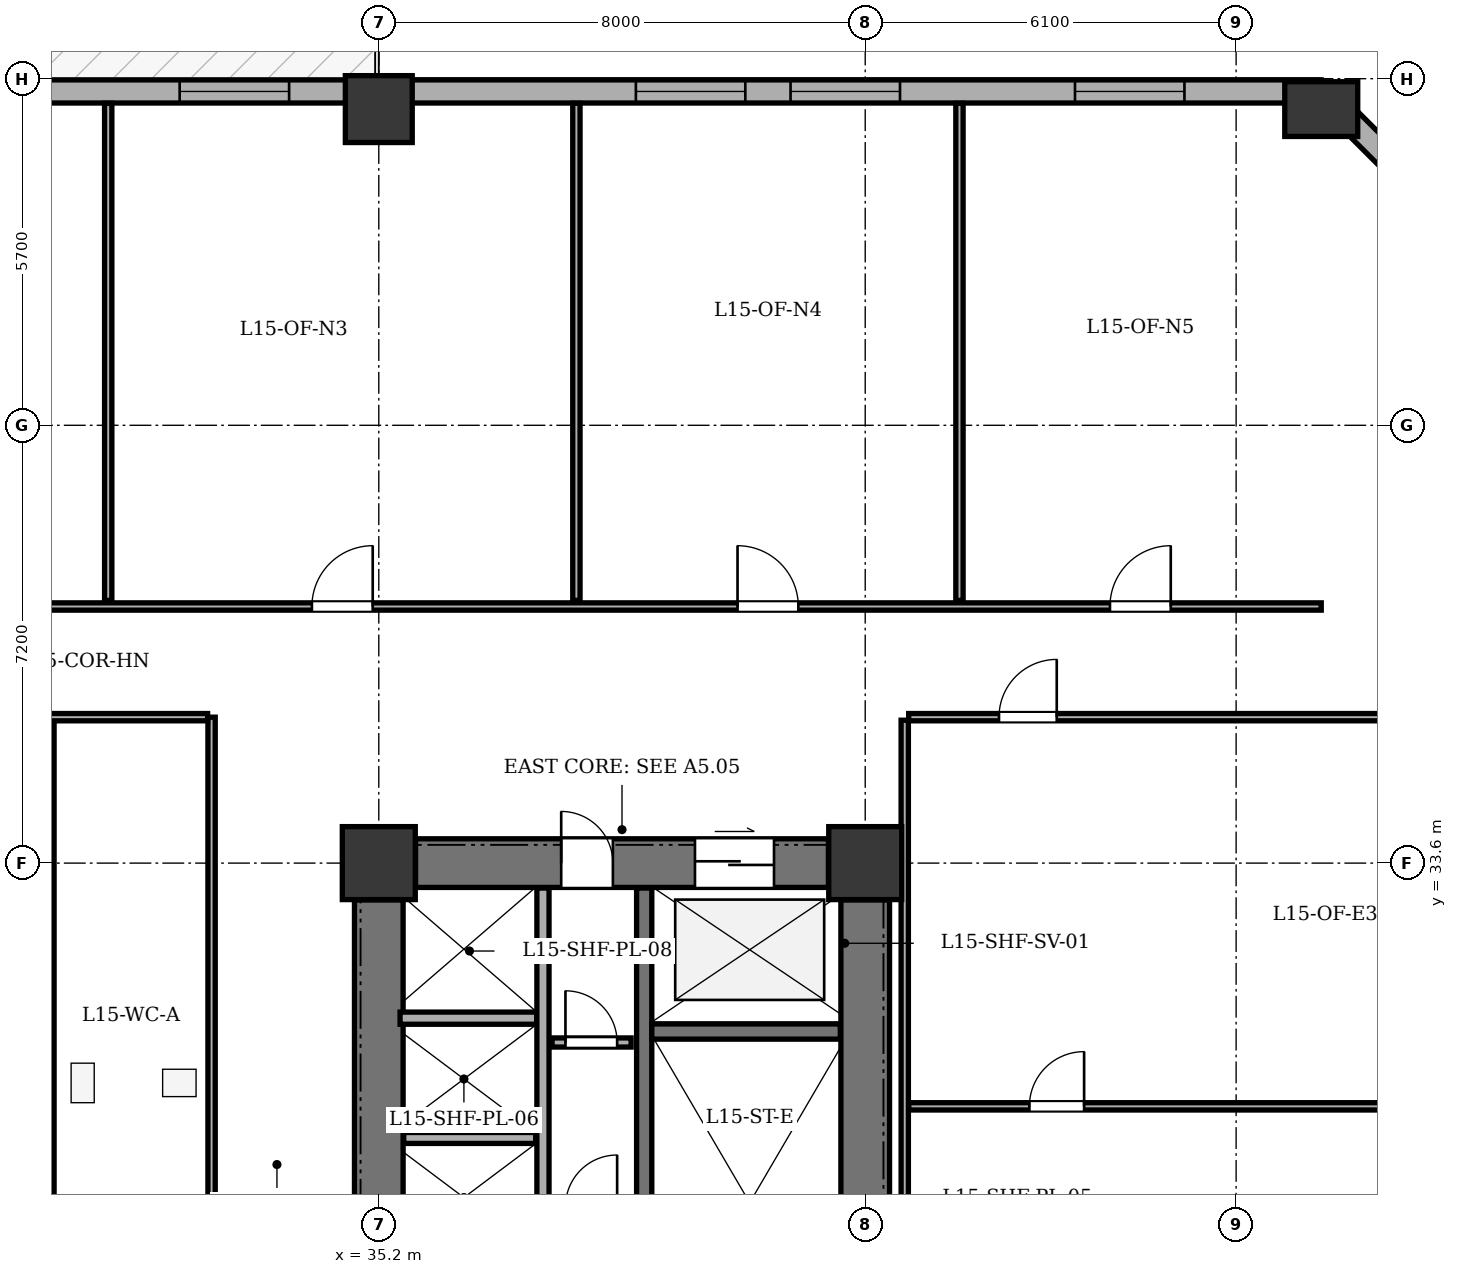
"""IFC4 building model, lengths in metres.
Left out: names, types, materials, properties, quantities, classifications, styles, units other than length and angle.
Written with IfcOpenShell. Run it as: python <this file> out.ifc"""

import sys

from ifc_helpers import new_model, si_unit, direction, frame, frame_2d, origin, origin_2d, place, context, subcontext, project, spatial, rectangle, extrude, element, fill, save


model = new_model("IFC4")
c1 = context("Model", 3, precision=1e-05, world=origin(), true_north=direction((0.0, 1.0)))
c2 = subcontext(c1, "Body", "Model", "MODEL_VIEW")
j1 = project(units=[si_unit("LENGTHUNIT", "METRE"), si_unit("PLANEANGLEUNIT", "RADIAN")], contexts=[c1])
p1 = place(None, origin())
s1 = spatial("IfcSite", under=j1, at=p1, CompositionType="ELEMENT")
p2 = place(p1, origin())
s2 = spatial("IfcBuilding", under=s1, at=p2, CompositionType="ELEMENT")
p3 = place(p2, frame((0.0, 0.0, 63.3)))
s3 = spatial("IfcBuildingStorey", under=s2, at=p3, CompositionType="ELEMENT", Elevation=63.3)
for number, where, z_axis, x_axis in (
    (1, (35.2, 33.6, 0.0), (0.0, 0.0, 1.0), (1.0, 0.0, 0.0)),
    (2, (43.2, 33.6, 0.0), (0.0, 0.0, 1.0), (1.0, 0.0, 0.0)),
):
    element("IfcColumn", number, at=place(p3, frame(where, z_axis=z_axis, x_axis=x_axis)), inside=s3, PredefinedType="COLUMN", context=c2, shape_type="SweptSolid", body=[
        extrude(rectangle(XDim=1.2, YDim=1.2, at=origin_2d()), origin(), (0.0, 0.0, 1.0), 3.9),
    ])
p4 = place(p3, frame((35.2, 46.0, 0.0), z_axis=(0.0, 0.0, 1.0), x_axis=(1.0, 0.0, 0.0)))
e3 = element("IfcColumn", 3, at=p4, inside=s3, PredefinedType="COLUMN", context=c2, shape_type="SweptSolid", body=[
    extrude(rectangle(XDim=1.1, YDim=1.1, at=origin_2d()), origin(), (0.0, 0.0, 1.0), 3.9),
])
p5 = place(p3, frame((50.7, 46.0, 0.0), z_axis=(0.0, 0.0, 1.0), x_axis=(1.0, 0.0, 0.0)))
e4 = element("IfcColumn", 4, at=p5, inside=s3, PredefinedType="COLUMN", context=c2, shape_type="SweptSolid", body=[
    extrude(rectangle(XDim=0.9, YDim=1.2, at=origin_2d()), origin(), (0.0, 0.0, 1.0), 3.9),
])
p6 = place(p3, frame((15.7, 46.29, 0.0), z_axis=(0.0, 0.0, 1.0), x_axis=(1.0, 0.0, 0.0)))
e5 = element("IfcWall", 5, at=p6, inside=s3, PredefinedType="STANDARD", context=c2, shape_type="SweptSolid", body=[
    extrude(rectangle(XDim=35.0, YDim=0.38, at=frame_2d((17.5, 0.0))), origin(), (0.0, 0.0, 1.0), 3.135),
])
p7 = place(p6, frame((8.0, 0.0, 0.0)))
e6 = element("IfcOpeningElement", 6, at=p7, cuts=e5, PredefinedType="OPENING", context=c2, shape_type="SweptSolid", body=[
    extrude(rectangle(XDim=1.0, YDim=2.02, at=frame_2d((0.5, 1.01))), frame((0.0, 0.2, 0.0), z_axis=(0.0, -1.0, 0.0), x_axis=(1.0, 0.0, 0.0)), (0.0, 0.0, 1.0), 0.4),
])
p8 = place(p6, frame((1.675, 0.0, 0.8)))
e7 = element("IfcOpeningElement", 7, at=p8, cuts=e5, PredefinedType="OPENING", context=c2, shape_type="SweptSolid", body=[
    extrude(rectangle(XDim=1.8, YDim=1.9, at=frame_2d((0.9, 0.95))), frame((0.0, 0.2, 0.0), z_axis=(0.0, -1.0, 0.0), x_axis=(1.0, 0.0, 0.0)), (0.0, 0.0, 1.0), 0.4),
])
p9 = place(p6, frame((16.225, 0.0, 0.8)))
e8 = element("IfcOpeningElement", 8, at=p9, cuts=e5, PredefinedType="OPENING", context=c2, shape_type="SweptSolid", body=[
    extrude(rectangle(XDim=1.8, YDim=1.9, at=frame_2d((0.9, 0.95))), frame((0.0, 0.2, 0.0), z_axis=(0.0, -1.0, 0.0), x_axis=(1.0, 0.0, 0.0)), (0.0, 0.0, 1.0), 0.4),
])
p10 = place(p6, frame((23.728, 0.0, 0.8)))
e9 = element("IfcOpeningElement", 9, at=p10, cuts=e5, PredefinedType="OPENING", context=c2, shape_type="SweptSolid", body=[
    extrude(rectangle(XDim=1.8, YDim=1.9, at=frame_2d((0.9, 0.95))), frame((0.0, 0.2, 0.0), z_axis=(0.0, -1.0, 0.0), x_axis=(1.0, 0.0, 0.0)), (0.0, 0.0, 1.0), 0.4),
])
p11 = place(p6, frame((26.272, 0.0, 0.8)))
e10 = element("IfcOpeningElement", 10, at=p11, cuts=e5, PredefinedType="OPENING", context=c2, shape_type="SweptSolid", body=[
    extrude(rectangle(XDim=1.8, YDim=1.9, at=frame_2d((0.9, 0.95))), frame((0.0, 0.2, 0.0), z_axis=(0.0, -1.0, 0.0), x_axis=(1.0, 0.0, 0.0)), (0.0, 0.0, 1.0), 0.4),
])
p12 = place(p6, frame((30.95, 0.0, 0.8)))
e11 = element("IfcOpeningElement", 11, at=p12, cuts=e5, PredefinedType="OPENING", context=c2, shape_type="SweptSolid", body=[
    extrude(rectangle(XDim=1.8, YDim=1.9, at=frame_2d((0.9, 0.95))), frame((0.0, 0.2, 0.0), z_axis=(0.0, -1.0, 0.0), x_axis=(1.0, 0.0, 0.0)), (0.0, 0.0, 1.0), 0.4),
])
p13 = place(p3, frame((50.7, 46.29, 0.0), z_axis=(0.0, 0.0, 1.0), x_axis=(0.707106781187, -0.707106781187, 0.0)))
e12 = element("IfcWall", 12, at=p13, inside=s3, PredefinedType="STANDARD", context=c2, shape_type="SweptSolid", body=[
    extrude(rectangle(XDim=6.774, YDim=0.38, at=frame_2d((3.387, 0.0))), origin(), (0.0, 0.0, 1.0), 3.135),
])
p14 = place(p13, frame((2.687, 0.0, 0.8)))
e13 = element("IfcOpeningElement", 13, at=p14, cuts=e12, PredefinedType="OPENING", context=c2, shape_type="SweptSolid", body=[
    extrude(rectangle(XDim=1.4, YDim=1.65, at=frame_2d((0.7, 0.825))), frame((0.0, 0.2, 0.0), z_axis=(0.0, -1.0, 0.0), x_axis=(1.0, 0.0, 0.0)), (0.0, 0.0, 1.0), 0.4),
])
p15 = place(p3, frame((43.2, 21.405, 0.0), z_axis=(0.0, 0.0, 1.0), x_axis=(0.0, 1.0, 0.0)))
e14 = element("IfcWall", 14, at=p15, inside=s3, PredefinedType="SHEAR", context=c2, shape_type="SweptSolid", body=[
    extrude(rectangle(XDim=11.59, YDim=0.8, at=frame_2d((5.795, 0.0))), origin(), (0.0, 0.0, 1.0), 3.6),
])
p16 = place(p3, frame((35.805, 33.6, 0.0), z_axis=(0.0, 0.0, 1.0), x_axis=(1.0, 0.0, 0.0)))
e15 = element("IfcWall", 15, at=p16, inside=s3, PredefinedType="SHEAR", context=c2, shape_type="SweptSolid", body=[
    extrude(rectangle(XDim=6.79, YDim=0.8, at=frame_2d((3.395, 0.0))), origin(), (0.0, 0.0, 1.0), 3.6),
])
p17 = place(p16, frame((4.595, 0.0, 0.0)))
e16 = element("IfcOpeningElement", 16, at=p17, cuts=e15, PredefinedType="OPENING", context=c2, shape_type="SweptSolid", body=[
    extrude(rectangle(XDim=1.3, YDim=2.15, at=frame_2d((0.65, 1.075))), frame((0.0, 0.41, 0.0), z_axis=(0.0, -1.0, 0.0), x_axis=(1.0, 0.0, 0.0)), (0.0, 0.0, 1.0), 0.82),
])
p18 = place(p16, frame((2.395, 0.0, 0.0)))
e17 = element("IfcOpeningElement", 17, at=p18, cuts=e15, PredefinedType="OPENING", context=c2, shape_type="SweptSolid", body=[
    extrude(rectangle(XDim=0.85, YDim=2.02, at=frame_2d((0.425, 1.01))), frame((0.0, 0.41, 0.0), z_axis=(0.0, -1.0, 0.0), x_axis=(1.0, 0.0, 0.0)), (0.0, 0.0, 1.0), 0.82),
])
p19 = place(p3, frame((35.2, 21.405, 0.0), z_axis=(0.0, 0.0, 1.0), x_axis=(0.0, 1.0, 0.0)))
e18 = element("IfcWall", 18, at=p19, inside=s3, PredefinedType="SHEAR", context=c2, shape_type="SweptSolid", body=[
    extrude(rectangle(XDim=11.59, YDim=0.8, at=frame_2d((5.795, 0.0))), origin(), (0.0, 0.0, 1.0), 3.6),
])
p20 = place(p19, frame((1.195, 0.0, 0.0)))
e19 = element("IfcOpeningElement", 19, at=p20, cuts=e18, PredefinedType="OPENING", context=c2, shape_type="SweptSolid", body=[
    extrude(rectangle(XDim=1.2, YDim=2.15, at=frame_2d((0.6, 1.075))), frame((0.0, 0.41, 0.0), z_axis=(0.0, -1.0, 0.0), x_axis=(1.0, 0.0, 0.0)), (0.0, 0.0, 1.0), 0.82),
])
p21 = place(p3, frame((39.565, 21.21, 0.0), z_axis=(0.0, 0.0, 1.0), x_axis=(0.0, 1.0, 0.0)))
e20 = element("IfcWall", 20, at=p21, inside=s3, PredefinedType="SHEAR", context=c2, shape_type="SweptSolid", body=[
    extrude(rectangle(XDim=11.98, YDim=0.25, at=frame_2d((5.99, 0.0))), origin(), (0.0, 0.0, 1.0), 3.6),
])
p22 = place(p21, frame((0.44, 0.0, 0.0)))
e21 = element("IfcOpeningElement", 21, at=p22, cuts=e20, PredefinedType="OPENING", context=c2, shape_type="SweptSolid", body=[
    extrude(rectangle(XDim=1.2, YDim=2.15, at=frame_2d((0.6, 1.075))), frame((0.0, 0.135, 0.0), z_axis=(0.0, -1.0, 0.0), x_axis=(1.0, 0.0, 0.0)), (0.0, 0.0, 1.0), 0.27),
])
p23 = place(p21, frame((2.59, 0.0, 0.0)))
e22 = element("IfcOpeningElement", 22, at=p23, cuts=e20, PredefinedType="OPENING", context=c2, shape_type="SweptSolid", body=[
    extrude(rectangle(XDim=1.15, YDim=2.15, at=frame_2d((0.575, 1.075))), frame((0.0, 0.135, 0.0), z_axis=(0.0, -1.0, 0.0), x_axis=(1.0, 0.0, 0.0)), (0.0, 0.0, 1.0), 0.27),
])
p24 = place(p3, frame((39.69, 30.83, 0.0), z_axis=(0.0, 0.0, 1.0), x_axis=(1.0, 0.0, 0.0)))
e23 = element("IfcWall", 23, at=p24, inside=s3, PredefinedType="SHEAR", context=c2, shape_type="SweptSolid", body=[
    extrude(rectangle(XDim=3.1, YDim=0.25, at=frame_2d((1.55, 0.0))), origin(), (0.0, 0.0, 1.0), 3.6),
])
p25 = place(p3, frame((35.55, 31.05, 0.0), z_axis=(0.0, 0.0, 1.0), x_axis=(1.0, 0.0, 0.0)))
e24 = element("IfcWall", 24, at=p25, inside=s3, PredefinedType="SOLIDWALL", context=c2, shape_type="SweptSolid", body=[
    extrude(rectangle(XDim=2.25, YDim=0.2, at=frame_2d((1.125, 0.0))), origin(), (0.0, 0.0, 1.0), 3.6),
])
p26 = place(p3, frame((37.9, 25.27, 0.0), z_axis=(0.0, 0.0, 1.0), x_axis=(0.0, 1.0, 0.0)))
e25 = element("IfcWall", 25, at=p26, inside=s3, PredefinedType="SOLIDWALL", context=c2, shape_type="SweptSolid", body=[
    extrude(rectangle(XDim=7.92, YDim=0.2, at=frame_2d((3.96, 0.0))), origin(), (0.0, 0.0, 1.0), 3.6),
])
p27 = place(p3, frame((35.61, 29.08, 0.0), z_axis=(0.0, 0.0, 1.0), x_axis=(1.0, 0.0, 0.0)))
e26 = element("IfcWall", 26, at=p27, inside=s3, PredefinedType="PARTITIONING", context=c2, shape_type="SweptSolid", body=[
    extrude(rectangle(XDim=2.17, YDim=0.18, at=frame_2d((1.085, 0.0))), origin(), (0.0, 0.0, 1.0), 3.6),
])
p28 = place(p3, frame((38.05, 30.65, 0.0), z_axis=(0.0, 0.0, 1.0), x_axis=(1.0, 0.0, 0.0)))
e27 = element("IfcWall", 27, at=p28, inside=s3, PredefinedType="PARTITIONING", context=c2, shape_type="SweptSolid", body=[
    extrude(rectangle(XDim=1.3, YDim=0.15, at=frame_2d((0.65, 0.0))), origin(), (0.0, 0.0, 1.0), 3.6),
])
p29 = place(p28, frame((0.22, 0.0, 0.0)))
e28 = element("IfcOpeningElement", 28, at=p29, cuts=e27, PredefinedType="OPENING", context=c2, shape_type="SweptSolid", body=[
    extrude(rectangle(XDim=0.85, YDim=2.02, at=frame_2d((0.425, 1.01))), frame((0.0, 0.085, 0.0), z_axis=(0.0, -1.0, 0.0), x_axis=(1.0, 0.0, 0.0)), (0.0, 0.0, 1.0), 0.17),
])
p30 = place(p3, frame((32.45, 24.715, 0.0), z_axis=(0.0, 0.0, 1.0), x_axis=(0.0, 1.0, 0.0)))
e29 = element("IfcWall", 29, at=p30, inside=s3, PredefinedType="PARTITIONING", context=c2, shape_type="SweptSolid", body=[
    extrude(rectangle(XDim=11.285, YDim=0.12, at=frame_2d((5.643, 0.0))), origin(), (0.0, 0.0, 1.0), 3.6),
])
p31 = place(p3, frame((29.8, 24.715, 0.0), z_axis=(0.0, 0.0, 1.0), x_axis=(0.0, 1.0, 0.0)))
e30 = element("IfcWall", 30, at=p31, inside=s3, PredefinedType="PARTITIONING", context=c2, shape_type="SweptSolid", body=[
    extrude(rectangle(XDim=11.285, YDim=0.12, at=frame_2d((5.643, 0.0))), origin(), (0.0, 0.0, 1.0), 3.135),
])
p32 = place(p3, frame((23.615, 36.0, 0.0), z_axis=(0.0, 0.0, 1.0), x_axis=(1.0, 0.0, 0.0)))
e31 = element("IfcWall", 31, at=p32, inside=s3, PredefinedType="PARTITIONING", context=c2, shape_type="SweptSolid", body=[
    extrude(rectangle(XDim=8.77, YDim=0.12, at=frame_2d((4.385, 0.0))), origin(), (0.0, 0.0, 1.0), 3.6),
])
p33 = place(p3, frame((15.7, 37.82, 0.0), z_axis=(0.0, 0.0, 1.0), x_axis=(1.0, 0.0, 0.0)))
e32 = element("IfcWall", 32, at=p33, inside=s3, PredefinedType="PARTITIONING", context=c2, shape_type="SweptSolid", body=[
    extrude(rectangle(XDim=35.0, YDim=0.12, at=frame_2d((17.5, 0.0))), origin(), (0.0, 0.0, 1.0), 3.6),
])
p34 = place(p33, frame((3.175, 0.0, 0.0)))
e33 = element("IfcOpeningElement", 33, at=p34, cuts=e32, PredefinedType="OPENING", context=c2, shape_type="SweptSolid", body=[
    extrude(rectangle(XDim=1.0, YDim=2.1, at=frame_2d((0.5, 1.05))), frame((0.0, 0.07, 0.0), z_axis=(0.0, -1.0, 0.0), x_axis=(1.0, 0.0, 0.0)), (0.0, 0.0, 1.0), 0.14),
])
p35 = place(p33, frame((10.7, 0.0, 0.0)))
e34 = element("IfcOpeningElement", 34, at=p35, cuts=e32, PredefinedType="OPENING", context=c2, shape_type="SweptSolid", body=[
    extrude(rectangle(XDim=1.0, YDim=2.1, at=frame_2d((0.5, 1.05))), frame((0.0, 0.07, 0.0), z_axis=(0.0, -1.0, 0.0), x_axis=(1.0, 0.0, 0.0)), (0.0, 0.0, 1.0), 0.14),
])
p36 = place(p33, frame((18.4, 0.0, 0.0)))
e35 = element("IfcOpeningElement", 35, at=p36, cuts=e32, PredefinedType="OPENING", context=c2, shape_type="SweptSolid", body=[
    extrude(rectangle(XDim=1.0, YDim=2.1, at=frame_2d((0.5, 1.05))), frame((0.0, 0.07, 0.0), z_axis=(0.0, -1.0, 0.0), x_axis=(1.0, 0.0, 0.0)), (0.0, 0.0, 1.0), 0.14),
])
p37 = place(p33, frame((25.4, 0.0, 0.0)))
e36 = element("IfcOpeningElement", 36, at=p37, cuts=e32, PredefinedType="OPENING", context=c2, shape_type="SweptSolid", body=[
    extrude(rectangle(XDim=1.0, YDim=2.1, at=frame_2d((0.5, 1.05))), frame((0.0, 0.07, 0.0), z_axis=(0.0, -1.0, 0.0), x_axis=(1.0, 0.0, 0.0)), (0.0, 0.0, 1.0), 0.14),
])
p38 = place(p33, frame((31.525, 0.0, 0.0)))
e37 = element("IfcOpeningElement", 37, at=p38, cuts=e32, PredefinedType="OPENING", context=c2, shape_type="SweptSolid", body=[
    extrude(rectangle(XDim=1.0, YDim=2.1, at=frame_2d((0.5, 1.05))), frame((0.0, 0.07, 0.0), z_axis=(0.0, -1.0, 0.0), x_axis=(1.0, 0.0, 0.0)), (0.0, 0.0, 1.0), 0.14),
])
for number, where, z_axis, x_axis in (
    (38, (30.75, 37.92, 0.0), (0.0, 0.0, 1.0), (0.0, 1.0, 0.0)),
    (39, (38.45, 37.92, 0.0), (0.0, 0.0, 1.0), (0.0, 1.0, 0.0)),
    (40, (44.75, 37.92, 0.0), (0.0, 0.0, 1.0), (0.0, 1.0, 0.0)),
):
    element("IfcWall", number, at=place(p3, frame(where, z_axis=z_axis, x_axis=x_axis)), inside=s3, PredefinedType="PARTITIONING", context=c2, shape_type="SweptSolid", body=[
        extrude(rectangle(XDim=8.175, YDim=0.12, at=frame_2d((4.087, 0.0))), origin(), (0.0, 0.0, 1.0), 3.6),
    ])
p39 = place(p3, frame((43.85, 18.45, 0.0), z_axis=(0.0, 0.0, 1.0), x_axis=(0.0, 1.0, 0.0)))
e41 = element("IfcWall", 41, at=p39, inside=s3, PredefinedType="PARTITIONING", context=c2, shape_type="SweptSolid", body=[
    extrude(rectangle(XDim=17.5, YDim=0.12, at=frame_2d((8.75, 0.0))), origin(), (0.0, 0.0, 1.0), 3.6),
])
p40 = place(p3, frame((43.915, 36.0, 0.0), z_axis=(0.0, 0.0, 1.0), x_axis=(1.0, 0.0, 0.0)))
e42 = element("IfcWall", 42, at=p40, inside=s3, PredefinedType="PARTITIONING", context=c2, shape_type="SweptSolid", body=[
    extrude(rectangle(XDim=11.38, YDim=0.12, at=frame_2d((5.69, 0.0))), origin(), (0.0, 0.0, 1.0), 3.6),
])
p41 = place(p40, frame((1.485, 0.0, 0.0)))
e43 = element("IfcOpeningElement", 43, at=p41, cuts=e42, PredefinedType="OPENING", context=c2, shape_type="SweptSolid", body=[
    extrude(rectangle(XDim=0.95, YDim=2.1, at=frame_2d((0.475, 1.05))), frame((0.0, 0.07, 0.0), z_axis=(0.0, -1.0, 0.0), x_axis=(1.0, 0.0, 0.0)), (0.0, 0.0, 1.0), 0.14),
])
p42 = place(p3, frame((43.915, 29.6, 0.0), z_axis=(0.0, 0.0, 1.0), x_axis=(1.0, 0.0, 0.0)))
e44 = element("IfcWall", 44, at=p42, inside=s3, PredefinedType="PARTITIONING", context=c2, shape_type="SweptSolid", body=[
    extrude(rectangle(XDim=11.38, YDim=0.12, at=frame_2d((5.69, 0.0))), origin(), (0.0, 0.0, 1.0), 3.6),
])
p43 = place(p42, frame((1.985, 0.0, 0.0)))
e45 = element("IfcOpeningElement", 45, at=p43, cuts=e44, PredefinedType="OPENING", context=c2, shape_type="SweptSolid", body=[
    extrude(rectangle(XDim=0.9, YDim=2.05, at=frame_2d((0.45, 1.025))), frame((0.0, 0.07, 0.0), z_axis=(0.0, -1.0, 0.0), x_axis=(1.0, 0.0, 0.0)), (0.0, 0.0, 1.0), 0.14),
])
p44 = place(p9, origin())
e46 = element("IfcWindow", 46, at=p44, inside=s3, PartitioningType="SINGLE_PANEL", PredefinedType="WINDOW", context=c2, shape_type="SweptSolid", body=[
    extrude(rectangle(XDim=1.8, YDim=1.9, at=frame_2d((0.9, 0.95))), frame((0.0, -0.01, 0.0), z_axis=(0.0, -1.0, 0.0), x_axis=(1.0, 0.0, 0.0)), (0.0, 0.0, 1.0), 0.06),
])
fill(e8, e46)
p45 = place(p10, origin())
e47 = element("IfcWindow", 47, at=p45, inside=s3, PartitioningType="SINGLE_PANEL", PredefinedType="WINDOW", context=c2, shape_type="SweptSolid", body=[
    extrude(rectangle(XDim=1.8, YDim=1.9, at=frame_2d((0.9, 0.95))), frame((0.0, -0.01, 0.0), z_axis=(0.0, -1.0, 0.0), x_axis=(1.0, 0.0, 0.0)), (0.0, 0.0, 1.0), 0.06),
])
fill(e9, e47)
p46 = place(p11, origin())
e48 = element("IfcWindow", 48, at=p46, inside=s3, PartitioningType="SINGLE_PANEL", PredefinedType="WINDOW", context=c2, shape_type="SweptSolid", body=[
    extrude(rectangle(XDim=1.8, YDim=1.9, at=frame_2d((0.9, 0.95))), frame((0.0, -0.01, 0.0), z_axis=(0.0, -1.0, 0.0), x_axis=(1.0, 0.0, 0.0)), (0.0, 0.0, 1.0), 0.06),
])
fill(e10, e48)
p47 = place(p12, origin())
e49 = element("IfcWindow", 49, at=p47, inside=s3, PartitioningType="SINGLE_PANEL", PredefinedType="WINDOW", context=c2, shape_type="SweptSolid", body=[
    extrude(rectangle(XDim=1.8, YDim=1.9, at=frame_2d((0.9, 0.95))), frame((0.0, -0.01, 0.0), z_axis=(0.0, -1.0, 0.0), x_axis=(1.0, 0.0, 0.0)), (0.0, 0.0, 1.0), 0.06),
])
fill(e11, e49)
p48 = place(p17, origin())
e50 = element("IfcDoor", 50, at=p48, inside=s3, OperationType="DOUBLE_DOOR_SLIDING", PredefinedType="DOOR", context=c2, shape_type="SweptSolid", body=[
    extrude(rectangle(XDim=1.3, YDim=2.15, at=frame_2d((0.65, 1.075))), frame((0.0, 0.025, 0.0), z_axis=(0.0, -1.0, 0.0), x_axis=(1.0, 0.0, 0.0)), (0.0, 0.0, 1.0), 0.05),
])
fill(e16, e50)
p49 = place(p18, origin())
e51 = element("IfcDoor", 51, at=p49, inside=s3, OperationType="SINGLE_SWING_LEFT", PredefinedType="DOOR", context=c2, shape_type="SweptSolid", body=[
    extrude(rectangle(XDim=0.85, YDim=2.02, at=frame_2d((0.425, 1.01))), frame((0.0, 0.025, 0.0), z_axis=(0.0, -1.0, 0.0), x_axis=(1.0, 0.0, 0.0)), (0.0, 0.0, 1.0), 0.05),
])
fill(e17, e51)
p50 = place(p29, origin())
e52 = element("IfcDoor", 52, at=p50, inside=s3, OperationType="SINGLE_SWING_LEFT", PredefinedType="DOOR", context=c2, shape_type="SweptSolid", body=[
    extrude(rectangle(XDim=0.85, YDim=2.02, at=frame_2d((0.425, 1.01))), frame((0.0, 0.025, 0.0), z_axis=(0.0, -1.0, 0.0), x_axis=(1.0, 0.0, 0.0)), (0.0, 0.0, 1.0), 0.05),
])
fill(e28, e52)
p51 = place(p36, origin())
e53 = element("IfcDoor", 53, at=p51, inside=s3, OperationType="SINGLE_SWING_RIGHT", PredefinedType="DOOR", context=c2, shape_type="SweptSolid", body=[
    extrude(rectangle(XDim=1.0, YDim=2.1, at=frame_2d((0.5, 1.05))), frame((0.0, 0.025, 0.0), z_axis=(0.0, -1.0, 0.0), x_axis=(1.0, 0.0, 0.0)), (0.0, 0.0, 1.0), 0.05),
])
fill(e35, e53)
p52 = place(p37, origin())
e54 = element("IfcDoor", 54, at=p52, inside=s3, OperationType="SINGLE_SWING_LEFT", PredefinedType="DOOR", context=c2, shape_type="SweptSolid", body=[
    extrude(rectangle(XDim=1.0, YDim=2.1, at=frame_2d((0.5, 1.05))), frame((0.0, 0.025, 0.0), z_axis=(0.0, -1.0, 0.0), x_axis=(1.0, 0.0, 0.0)), (0.0, 0.0, 1.0), 0.05),
])
fill(e36, e54)
p53 = place(p38, origin())
e55 = element("IfcDoor", 55, at=p53, inside=s3, OperationType="SINGLE_SWING_RIGHT", PredefinedType="DOOR", context=c2, shape_type="SweptSolid", body=[
    extrude(rectangle(XDim=1.0, YDim=2.1, at=frame_2d((0.5, 1.05))), frame((0.0, 0.025, 0.0), z_axis=(0.0, -1.0, 0.0), x_axis=(1.0, 0.0, 0.0)), (0.0, 0.0, 1.0), 0.05),
])
fill(e37, e55)
p54 = place(p43, origin())
e56 = element("IfcDoor", 56, at=p54, inside=s3, OperationType="SINGLE_SWING_RIGHT", PredefinedType="DOOR", context=c2, shape_type="SweptSolid", body=[
    extrude(rectangle(XDim=0.9, YDim=2.05, at=frame_2d((0.45, 1.025))), frame((0.0, 0.025, 0.0), z_axis=(0.0, -1.0, 0.0), x_axis=(1.0, 0.0, 0.0)), (0.0, 0.0, 1.0), 0.05),
])
fill(e45, e56)
p55 = place(p41, origin())
e57 = element("IfcDoor", 57, at=p55, inside=s3, OperationType="SINGLE_SWING_RIGHT", PredefinedType="DOOR", context=c2, shape_type="SweptSolid", body=[
    extrude(rectangle(XDim=0.95, YDim=2.1, at=frame_2d((0.475, 1.05))), frame((0.0, 0.025, 0.0), z_axis=(0.0, -1.0, 0.0), x_axis=(1.0, 0.0, 0.0)), (0.0, 0.0, 1.0), 0.05),
])
fill(e43, e57)
save(model, sys.argv[1])
